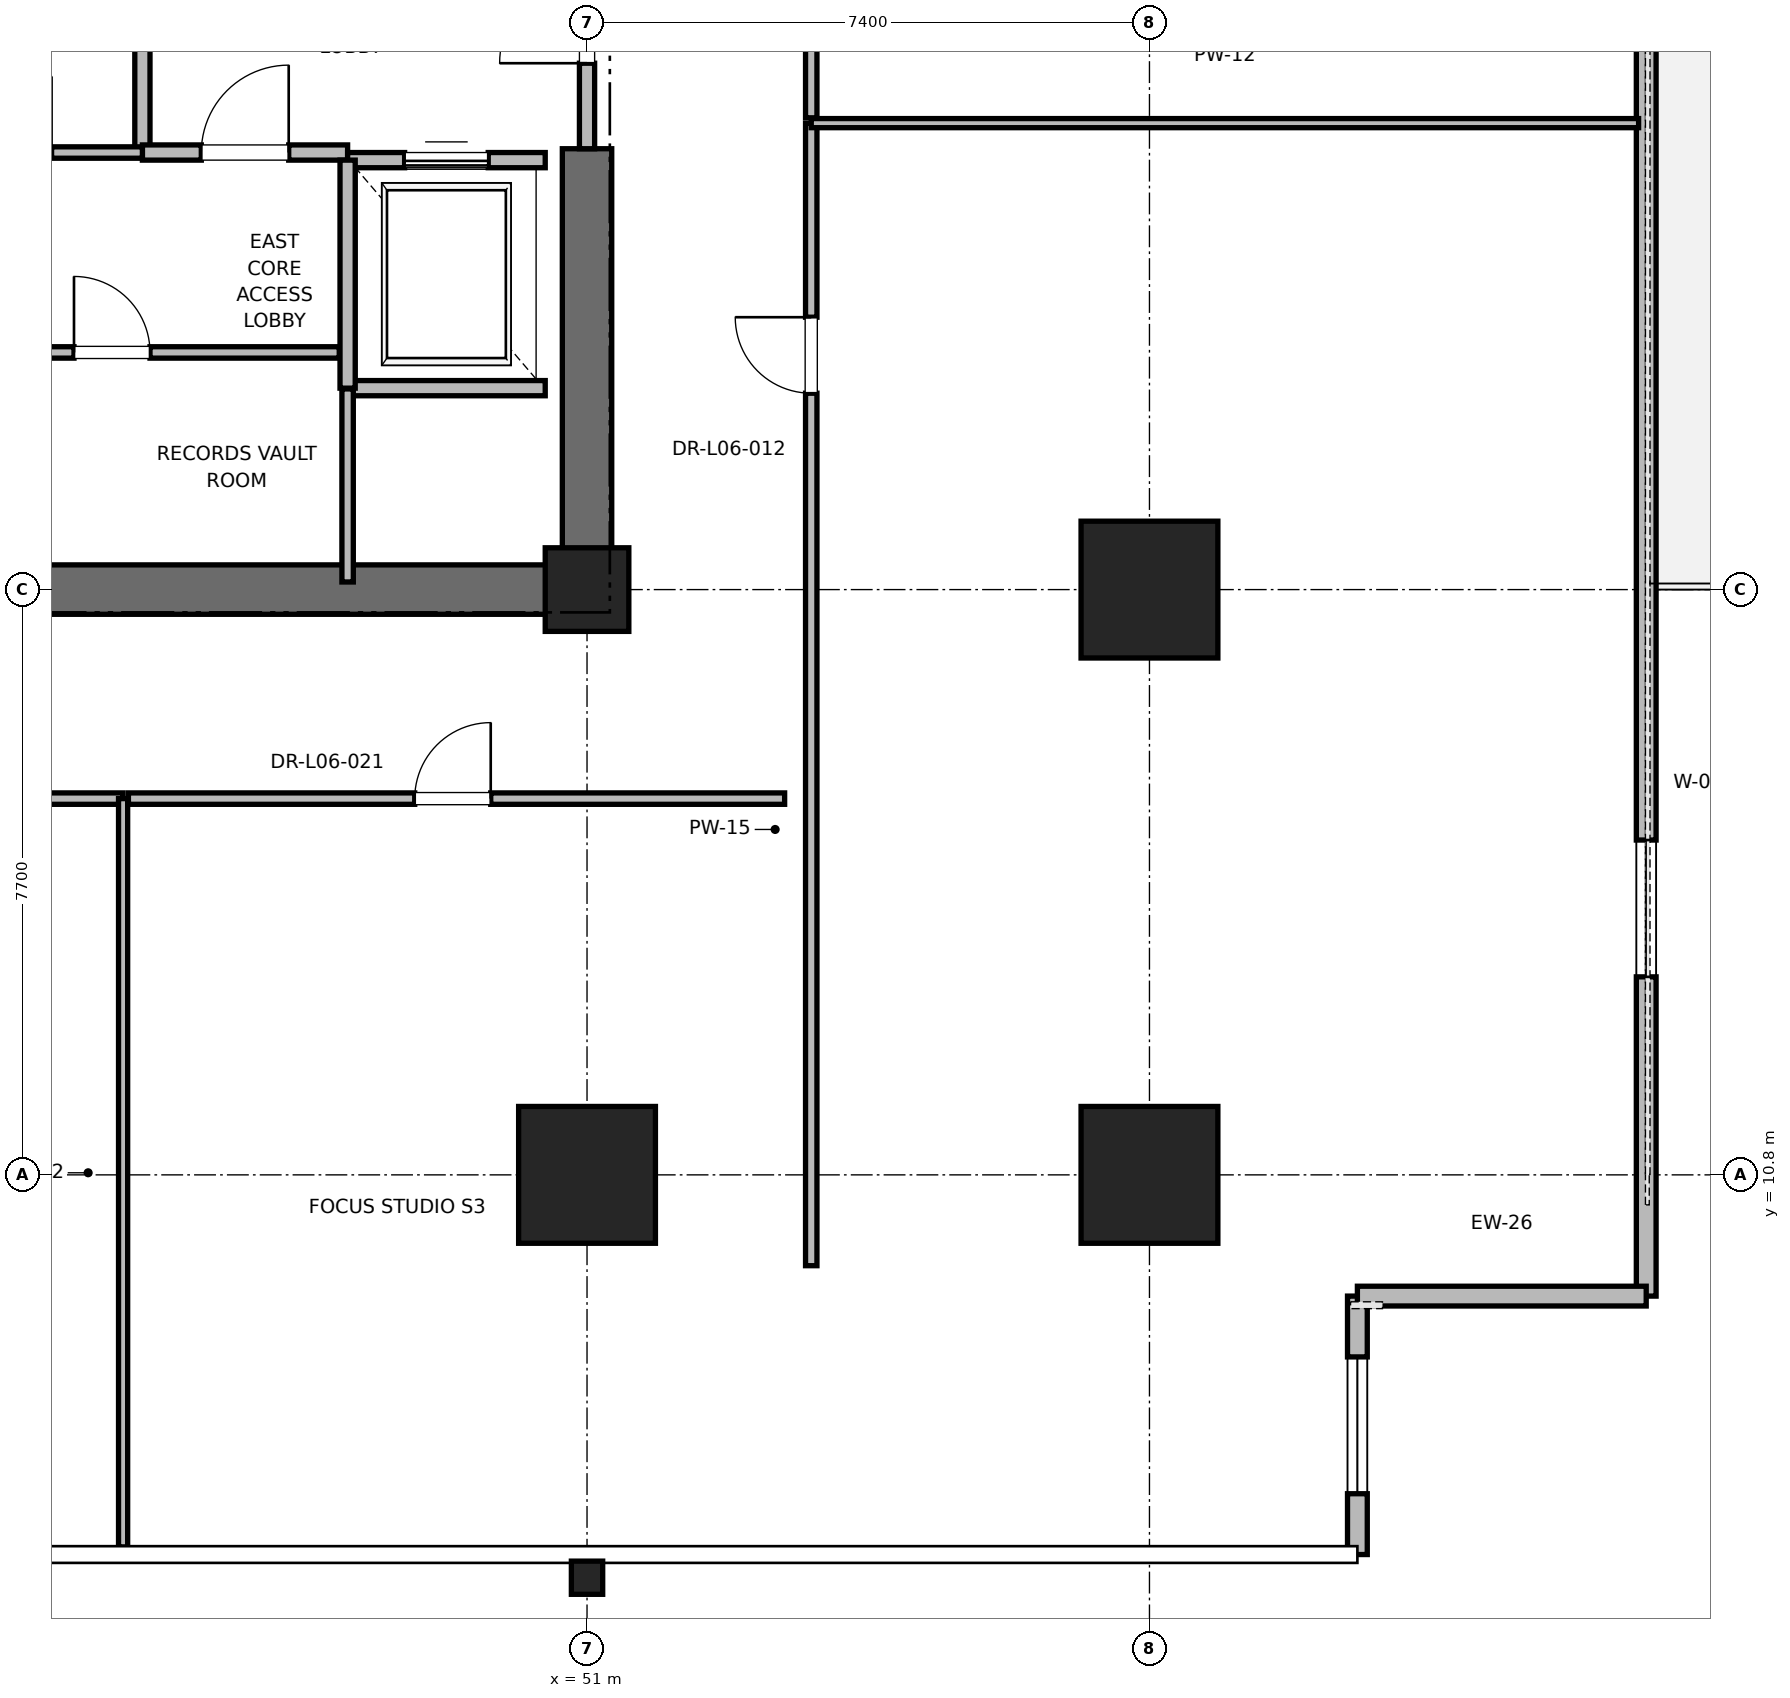
"""IFC4 building model, lengths in metres.
Left out: names, types, materials, properties, quantities, classifications, styles, units other than length and angle.
Written with IfcOpenShell. Run it as: python <this file> out.ifc"""

import sys

from ifc_helpers import new_model, si_unit, direction, frame, frame_2d, origin, origin_2d, place, context, subcontext, project, spatial, rectangle, i_section, extrude, element, fill, save


model = new_model("IFC4")
c1 = context("Model", 3, precision=1e-05, world=origin(), true_north=direction((0.0, 1.0)))
c2 = subcontext(c1, "Body", "Model", "MODEL_VIEW")
j1 = project(units=[si_unit("LENGTHUNIT", "METRE"), si_unit("PLANEANGLEUNIT", "RADIAN")], contexts=[c1])
p1 = place(None, origin())
s1 = spatial("IfcSite", under=j1, at=p1, CompositionType="ELEMENT")
p2 = place(p1, origin())
s2 = spatial("IfcBuilding", under=s1, at=p2, CompositionType="ELEMENT")
p3 = place(p2, frame((0.0, 0.0, 31.6)))
s3 = spatial("IfcBuildingStorey", under=s2, at=p3, CompositionType="ELEMENT", Elevation=31.6)
for number, where, z_axis, x_axis in (
    (1, (51.0, 10.8, 0.0), (0.0, 0.0, 1.0), (1.0, 0.0, 0.0)),
    (2, (58.4, 18.5, 0.0), (0.0, 0.0, 1.0), (1.0, 0.0, 0.0)),
    (3, (58.4, 10.8, 0.0), (0.0, 0.0, 1.0), (1.0, 0.0, 0.0)),
):
    element("IfcColumn", number, at=place(p3, frame(where, z_axis=z_axis, x_axis=x_axis)), inside=s3, PredefinedType="COLUMN", context=c2, shape_type="SweptSolid", body=[
        extrude(rectangle(XDim=1.8, YDim=1.8, at=origin_2d()), origin(), (0.0, 0.0, 1.0), 4.0),
    ])
p4 = place(p3, frame((51.0, 5.5, 0.0), z_axis=(0.0, 0.0, 1.0), x_axis=(1.0, 0.0, 0.0)))
e4 = element("IfcColumn", 4, at=p4, inside=s3, PredefinedType="COLUMN", context=c2, shape_type="SweptSolid", body=[
    extrude(i_section(OverallWidth=0.412, OverallDepth=0.437, WebThickness=0.036, FlangeThickness=0.058, FilletRadius=0.015, at=origin_2d()), origin(), (0.0, 0.0, 1.0), 4.0),
])
p5 = place(p3, frame((51.0, 18.5, 0.0), z_axis=(0.0, 0.0, 1.0), x_axis=(1.0, 0.0, 0.0)))
e5 = element("IfcColumn", 5, at=p5, inside=s3, PredefinedType="PILASTER", context=c2, shape_type="SweptSolid", body=[
    extrude(rectangle(XDim=1.1, YDim=1.1, at=origin_2d()), origin(), (0.0, 0.0, 1.0), 4.0),
])
p6 = place(p3, frame((41.8, 18.5, 0.0), z_axis=(0.0, 0.0, 1.0), x_axis=(1.0, 0.0, 0.0)))
e6 = element("IfcWall", 6, at=p6, inside=s3, PredefinedType="SHEAR", context=c2, shape_type="SweptSolid", body=[
    extrude(rectangle(XDim=9.2, YDim=0.65, at=frame_2d((4.6, 0.0))), origin(), (0.0, 0.0, 1.0), 3.76),
])
p7 = place(p3, frame((51.0, 18.5, 0.0), z_axis=(0.0, 0.0, 1.0), x_axis=(0.0, 1.0, 0.0)))
e7 = element("IfcWall", 7, at=p7, inside=s3, PredefinedType="SHEAR", context=c2, shape_type="SweptSolid", body=[
    extrude(rectangle(XDim=5.8, YDim=0.65, at=frame_2d((2.9, 0.0))), origin(), (0.0, 0.0, 1.0), 3.76),
])
p8 = place(p3, frame((64.936, 9.205, 0.0), z_axis=(0.0, 0.0, 1.0), x_axis=(0.0, 1.0, 0.0)))
e8 = element("IfcWall", 8, at=p8, inside=s3, PredefinedType="PARAPET", context=c2, shape_type="SweptSolid", body=[
    extrude(rectangle(XDim=36.59, YDim=0.26, at=frame_2d((18.295, 0.0))), origin(), (0.0, 0.0, 1.0), 2.889),
])
p9 = place(p8, frame((4.2, 0.0, 0.85)))
e9 = element("IfcOpeningElement", 9, at=p9, cuts=e8, PredefinedType="OPENING", context=c2, shape_type="SweptSolid", body=[
    extrude(rectangle(XDim=1.8, YDim=2.2, at=frame_2d((0.9, 1.1))), frame((0.0, 0.13, 0.0), z_axis=(0.0, -1.0, 0.0), x_axis=(1.0, 0.0, 0.0)), (0.0, 0.0, 1.0), 0.26),
])
p10 = place(p8, frame((17.695, 0.0, 0.0)))
e10 = element("IfcOpeningElement", 10, at=p10, cuts=e8, PredefinedType="OPENING", context=c2, shape_type="SweptSolid", body=[
    extrude(rectangle(XDim=1.2, YDim=2.2, at=frame_2d((0.6, 1.1))), frame((0.0, 0.13, 0.0), z_axis=(0.0, -1.0, 0.0), x_axis=(1.0, 0.0, 0.0)), (0.0, 0.0, 1.0), 0.26),
])
p11 = place(p8, frame((30.59, 0.0, 0.85)))
e11 = element("IfcOpeningElement", 11, at=p11, cuts=e8, PredefinedType="OPENING", context=c2, shape_type="SweptSolid", body=[
    extrude(rectangle(XDim=1.8, YDim=2.2, at=frame_2d((0.9, 1.1))), frame((0.0, 0.13, 0.0), z_axis=(0.0, -1.0, 0.0), x_axis=(1.0, 0.0, 0.0)), (0.0, 0.0, 1.0), 0.26),
])
p12 = place(p3, frame((61.136, 5.805, 0.0), z_axis=(0.0, 0.0, 1.0), x_axis=(0.0, 1.0, 0.0)))
e12 = element("IfcWall", 12, at=p12, inside=s3, PredefinedType="PARAPET", context=c2, shape_type="SweptSolid", body=[
    extrude(rectangle(XDim=3.4, YDim=0.26, at=frame_2d((1.7, 0.0))), origin(), (0.0, 0.0, 1.0), 3.76),
])
p13 = place(p12, frame((0.8, 0.0, 0.85)))
e13 = element("IfcOpeningElement", 13, at=p13, cuts=e12, PredefinedType="OPENING", context=c2, shape_type="SweptSolid", body=[
    extrude(rectangle(XDim=1.8, YDim=2.2, at=frame_2d((0.9, 1.1))), frame((0.0, 0.13, 0.0), z_axis=(0.0, -1.0, 0.0), x_axis=(1.0, 0.0, 0.0)), (0.0, 0.0, 1.0), 0.26),
])
p14 = place(p3, frame((61.136, 9.205, 0.0), z_axis=(0.0, 0.0, 1.0), x_axis=(1.0, 0.0, 0.0)))
e14 = element("IfcWall", 14, at=p14, inside=s3, PredefinedType="PARAPET", context=c2, shape_type="SweptSolid", body=[
    extrude(rectangle(XDim=3.8, YDim=0.26, at=frame_2d((1.9, 0.0))), origin(), (0.0, 0.0, 1.0), 3.76),
])
p15 = place(p3, frame((45.15, 24.25, 0.0), z_axis=(0.0, 0.0, 1.0), x_axis=(0.0, 1.0, 0.0)))
e15 = element("IfcWall", 15, at=p15, inside=s3, PredefinedType="PARTITIONING", context=c2, shape_type="SweptSolid", body=[
    extrude(rectangle(XDim=3.37, YDim=0.2, at=frame_2d((1.685, 0.0))), origin(), (0.0, 0.0, 1.0), 3.76),
])
p16 = place(p3, frame((45.15, 24.25, 0.0), z_axis=(0.0, 0.0, 1.0), x_axis=(1.0, 0.0, 0.0)))
e16 = element("IfcWall", 16, at=p16, inside=s3, PredefinedType="PARTITIONING", context=c2, shape_type="SweptSolid", body=[
    extrude(rectangle(XDim=2.7, YDim=0.2, at=frame_2d((1.35, 0.0))), origin(), (0.0, 0.0, 1.0), 3.76),
])
p17 = place(p16, frame((0.775, 0.0, 0.0)))
e17 = element("IfcOpeningElement", 17, at=p17, cuts=e16, PredefinedType="OPENING", context=c2, shape_type="SweptSolid", body=[
    extrude(rectangle(XDim=1.15, YDim=2.2, at=frame_2d((0.575, 1.1))), frame((0.0, 0.1, 0.0), z_axis=(0.0, -1.0, 0.0), x_axis=(1.0, 0.0, 0.0)), (0.0, 0.0, 1.0), 0.2),
])
p18 = place(p3, frame((51.0, 24.3, 0.0), z_axis=(0.0, 0.0, 1.0), x_axis=(0.0, 1.0, 0.0)))
e18 = element("IfcWall", 18, at=p18, inside=s3, PredefinedType="PARTITIONING", context=c2, shape_type="SweptSolid", body=[
    extrude(rectangle(XDim=3.4, YDim=0.2, at=frame_2d((1.7, 0.0))), origin(), (0.0, 0.0, 1.0), 2.54),
])
p19 = place(p18, frame((1.125, 0.0, 0.0)))
e19 = element("IfcOpeningElement", 19, at=p19, cuts=e18, PredefinedType="OPENING", context=c2, shape_type="SweptSolid", body=[
    extrude(rectangle(XDim=1.15, YDim=2.2, at=frame_2d((0.575, 1.1))), frame((0.0, 0.1, 0.0), z_axis=(0.0, -1.0, 0.0), x_axis=(1.0, 0.0, 0.0)), (0.0, 0.0, 1.0), 0.2),
])
p20 = place(p3, frame((47.85, 21.15, 0.0), z_axis=(0.0, 0.0, 1.0), x_axis=(1.0, 0.0, 0.0)))
e20 = element("IfcWall", 20, at=p20, inside=s3, PredefinedType="SOLIDWALL", context=c2, shape_type="SweptSolid", body=[
    extrude(rectangle(XDim=2.6, YDim=0.2, at=frame_2d((1.3, 0.0))), origin(), (0.0, 0.0, 1.0), 3.76),
])
p21 = place(p3, frame((50.45, 24.15, 0.0), z_axis=(0.0, 0.0, 1.0), x_axis=(-1.0, 0.0, 0.0)))
e21 = element("IfcWall", 21, at=p21, inside=s3, PredefinedType="SOLIDWALL", context=c2, shape_type="SweptSolid", body=[
    extrude(rectangle(XDim=2.6, YDim=0.2, at=frame_2d((1.3, 0.0))), origin(), (0.0, 0.0, 1.0), 2.54),
])
p22 = place(p21, frame((0.75, 0.0, 0.0)))
e22 = element("IfcOpeningElement", 22, at=p22, cuts=e21, PredefinedType="OPENING", context=c2, shape_type="SweptSolid", body=[
    extrude(rectangle(XDim=1.1, YDim=2.2, at=frame_2d((0.55, 1.1))), frame((0.0, 0.1, 0.0), z_axis=(0.0, -1.0, 0.0), x_axis=(1.0, 0.0, 0.0)), (0.0, 0.0, 1.0), 0.2),
])
p23 = place(p3, frame((47.85, 24.15, 0.0), z_axis=(0.0, 0.0, 1.0), x_axis=(0.0, -1.0, 0.0)))
e23 = element("IfcWall", 23, at=p23, inside=s3, PredefinedType="SOLIDWALL", context=c2, shape_type="SweptSolid", body=[
    extrude(rectangle(XDim=3.0, YDim=0.2, at=frame_2d((1.5, 0.0))), origin(), (0.0, 0.0, 1.0), 3.76),
])
p24 = place(p3, frame((47.85, 18.6, 0.0), z_axis=(0.0, 0.0, 1.0), x_axis=(0.0, 1.0, 0.0)))
e24 = element("IfcWall", 24, at=p24, inside=s3, PredefinedType="PARTITIONING", context=c2, shape_type="SweptSolid", body=[
    extrude(rectangle(XDim=2.54, YDim=0.15, at=frame_2d((1.27, 0.0))), origin(), (0.0, 0.0, 1.0), 2.85),
])
p25 = place(p3, frame((41.76, 21.62, 0.0), z_axis=(0.0, 0.0, 1.0), x_axis=(1.0, 0.0, 0.0)))
e25 = element("IfcWall", 25, at=p25, inside=s3, PredefinedType="PARTITIONING", context=c2, shape_type="SweptSolid", body=[
    extrude(rectangle(XDim=5.98, YDim=0.15, at=frame_2d((2.99, 0.0))), origin(), (0.0, 0.0, 1.0), 2.85),
])
p26 = place(p25, frame((2.49, 0.0, 0.0)))
e26 = element("IfcOpeningElement", 26, at=p26, cuts=e25, PredefinedType="OPENING", context=c2, shape_type="SweptSolid", body=[
    extrude(rectangle(XDim=1.0, YDim=2.15, at=frame_2d((0.5, 1.075))), frame((0.0, 0.075, 0.0), z_axis=(0.0, -1.0, 0.0), x_axis=(1.0, 0.0, 0.0)), (0.0, 0.0, 1.0), 0.15),
])
p27 = place(p3, frame((41.76, 24.25, 0.0), z_axis=(0.0, 0.0, 1.0), x_axis=(1.0, 0.0, 0.0)))
e27 = element("IfcWall", 27, at=p27, inside=s3, PredefinedType="PARTITIONING", context=c2, shape_type="SweptSolid", body=[
    extrude(rectangle(XDim=3.39, YDim=0.15, at=frame_2d((1.695, 0.0))), origin(), (0.0, 0.0, 1.0), 2.85),
])
p28 = place(p27, frame((1.195, 0.0, 0.0)))
e28 = element("IfcOpeningElement", 28, at=p28, cuts=e27, PredefinedType="OPENING", context=c2, shape_type="SweptSolid", body=[
    extrude(rectangle(XDim=1.0, YDim=2.15, at=frame_2d((0.5, 1.075))), frame((0.0, 0.075, 0.0), z_axis=(0.0, -1.0, 0.0), x_axis=(1.0, 0.0, 0.0)), (0.0, 0.0, 1.0), 0.15),
])
p29 = place(p3, frame((35.174, 15.75, 0.0), z_axis=(0.0, 0.0, 1.0), x_axis=(1.0, 0.0, 0.0)))
e29 = element("IfcWall", 29, at=p29, inside=s3, PredefinedType="PARTITIONING", context=c2, shape_type="SweptSolid", body=[
    extrude(rectangle(XDim=9.722, YDim=0.15, at=frame_2d((4.861, 0.0))), origin(), (0.0, 0.0, 1.0), 2.85),
])
p30 = place(p29, frame((4.326, 0.0, 0.0)))
e30 = element("IfcOpeningElement", 30, at=p30, cuts=e29, PredefinedType="OPENING", context=c2, shape_type="SweptSolid", body=[
    extrude(rectangle(XDim=1.0, YDim=2.15, at=frame_2d((0.5, 1.075))), frame((0.0, 0.075, 0.0), z_axis=(0.0, -1.0, 0.0), x_axis=(1.0, 0.0, 0.0)), (0.0, 0.0, 1.0), 0.15),
])
p31 = place(p3, frame((44.896, 5.905, 0.0), z_axis=(0.0, 0.0, 1.0), x_axis=(0.0, 1.0, 0.0)))
e31 = element("IfcWall", 31, at=p31, inside=s3, PredefinedType="PARTITIONING", context=c2, shape_type="SweptSolid", body=[
    extrude(rectangle(XDim=9.845, YDim=0.12, at=frame_2d((4.922, 0.0))), origin(), (0.0, 0.0, 1.0), 2.39),
])
p32 = place(p3, frame((44.966, 15.75, 0.0), z_axis=(0.0, 0.0, 1.0), x_axis=(1.0, 0.0, 0.0)))
e32 = element("IfcWall", 32, at=p32, inside=s3, PredefinedType="PARTITIONING", context=c2, shape_type="SweptSolid", body=[
    extrude(rectangle(XDim=8.634, YDim=0.15, at=frame_2d((4.317, 0.0))), origin(), (0.0, 0.0, 1.0), 2.85),
])
p33 = place(p32, frame((3.767, 0.0, 0.0)))
e33 = element("IfcOpeningElement", 33, at=p33, cuts=e32, PredefinedType="OPENING", context=c2, shape_type="SweptSolid", body=[
    extrude(rectangle(XDim=1.0, YDim=2.15, at=frame_2d((0.5, 1.075))), frame((0.0, 0.075, 0.0), z_axis=(0.0, -1.0, 0.0), x_axis=(1.0, 0.0, 0.0)), (0.0, 0.0, 1.0), 0.15),
])
p34 = place(p3, frame((53.95, 9.605, 0.0), z_axis=(0.0, 0.0, 1.0), x_axis=(0.0, 1.0, 0.0)))
e34 = element("IfcWall", 34, at=p34, inside=s3, PredefinedType="PARTITIONING", context=c2, shape_type="SweptSolid", body=[
    extrude(rectangle(XDim=15.032, YDim=0.15, at=frame_2d((7.516, 0.0))), origin(), (0.0, 0.0, 1.0), 2.85),
])
p35 = place(p34, frame((11.479, 0.0, 0.0)))
e35 = element("IfcOpeningElement", 35, at=p35, cuts=e34, PredefinedType="OPENING", context=c2, shape_type="SweptSolid", body=[
    extrude(rectangle(XDim=1.0, YDim=2.15, at=frame_2d((0.5, 1.075))), frame((0.0, 0.075, 0.0), z_axis=(0.0, -1.0, 0.0), x_axis=(1.0, 0.0, 0.0)), (0.0, 0.0, 1.0), 0.15),
])
p36 = place(p3, frame((53.95, 24.637, 0.0), z_axis=(0.0, 0.0, 1.0), x_axis=(1.0, 0.0, 0.0)))
e36 = element("IfcWall", 36, at=p36, inside=s3, PredefinedType="PARTITIONING", context=c2, shape_type="SweptSolid", body=[
    extrude(rectangle(XDim=10.886, YDim=0.12, at=frame_2d((5.443, 0.0))), origin(), (0.0, 0.0, 1.0), 2.85),
])
p37 = place(p3, frame((53.95, 24.707, 0.0), z_axis=(0.0, 0.0, 1.0), x_axis=(0.0, 1.0, 0.0)))
e37 = element("IfcWall", 37, at=p37, inside=s3, PredefinedType="PARTITIONING", context=c2, shape_type="SweptSolid", body=[
    extrude(rectangle(XDim=20.688, YDim=0.15, at=frame_2d((10.344, 0.0))), origin(), (0.0, 0.0, 1.0), 2.85),
])
p38 = place(p37, frame((5.347, 0.0, 0.0)))
e38 = element("IfcOpeningElement", 38, at=p38, cuts=e37, PredefinedType="OPENING", context=c2, shape_type="SweptSolid", body=[
    extrude(rectangle(XDim=1.0, YDim=2.15, at=frame_2d((0.5, 1.075))), frame((0.0, 0.075, 0.0), z_axis=(0.0, -1.0, 0.0), x_axis=(1.0, 0.0, 0.0)), (0.0, 0.0, 1.0), 0.15),
])
p39 = place(p9, origin())
e39 = element("IfcWindow", 39, at=p39, inside=s3, PartitioningType="SINGLE_PANEL", PredefinedType="WINDOW", context=c2, shape_type="SweptSolid", body=[
    extrude(rectangle(XDim=1.8, YDim=2.2, at=frame_2d((0.9, 1.1))), frame((0.0, 0.03, 0.0), z_axis=(0.0, -1.0, 0.0), x_axis=(1.0, 0.0, 0.0)), (0.0, 0.0, 1.0), 0.06),
])
fill(e9, e39)
p40 = place(p13, origin())
e40 = element("IfcWindow", 40, at=p40, inside=s3, PartitioningType="SINGLE_PANEL", PredefinedType="WINDOW", context=c2, shape_type="SweptSolid", body=[
    extrude(rectangle(XDim=1.8, YDim=2.2, at=frame_2d((0.9, 1.1))), frame((0.0, 0.03, 0.0), z_axis=(0.0, -1.0, 0.0), x_axis=(1.0, 0.0, 0.0)), (0.0, 0.0, 1.0), 0.06),
])
fill(e13, e40)
p41 = place(p17, origin())
e41 = element("IfcDoor", 41, at=p41, inside=s3, OperationType="SINGLE_SWING_RIGHT", PredefinedType="DOOR", context=c2, shape_type="SweptSolid", body=[
    extrude(rectangle(XDim=1.15, YDim=2.2, at=frame_2d((0.575, 1.1))), frame((0.0, 0.025, 0.0), z_axis=(0.0, -1.0, 0.0), x_axis=(1.0, 0.0, 0.0)), (0.0, 0.0, 1.0), 0.05),
])
fill(e17, e41)
p42 = place(p19, origin())
e42 = element("IfcDoor", 42, at=p42, inside=s3, OperationType="SINGLE_SWING_LEFT", PredefinedType="DOOR", context=c2, shape_type="SweptSolid", body=[
    extrude(rectangle(XDim=1.15, YDim=2.2, at=frame_2d((0.575, 1.1))), frame((0.0, 0.025, 0.0), z_axis=(0.0, -1.0, 0.0), x_axis=(1.0, 0.0, 0.0)), (0.0, 0.0, 1.0), 0.05),
])
fill(e19, e42)
p43 = place(p22, origin())
e43 = element("IfcDoor", 43, at=p43, inside=s3, OperationType="SLIDING_TO_RIGHT", PredefinedType="DOOR", context=c2, shape_type="SweptSolid", body=[
    extrude(rectangle(XDim=1.1, YDim=2.2, at=frame_2d((0.55, 1.1))), frame((0.0, 0.025, 0.0), z_axis=(0.0, -1.0, 0.0), x_axis=(1.0, 0.0, 0.0)), (0.0, 0.0, 1.0), 0.05),
])
fill(e22, e43)
p44 = place(p26, origin())
e44 = element("IfcDoor", 44, at=p44, inside=s3, OperationType="SINGLE_SWING_LEFT", PredefinedType="DOOR", context=c2, shape_type="SweptSolid", body=[
    extrude(rectangle(XDim=1.0, YDim=2.15, at=frame_2d((0.5, 1.075))), frame((0.0, 0.025, 0.0), z_axis=(0.0, -1.0, 0.0), x_axis=(1.0, 0.0, 0.0)), (0.0, 0.0, 1.0), 0.05),
])
fill(e26, e44)
p45 = place(p33, origin())
e45 = element("IfcDoor", 45, at=p45, inside=s3, OperationType="SINGLE_SWING_RIGHT", PredefinedType="DOOR", context=c2, shape_type="SweptSolid", body=[
    extrude(rectangle(XDim=1.0, YDim=2.15, at=frame_2d((0.5, 1.075))), frame((0.0, 0.025, 0.0), z_axis=(0.0, -1.0, 0.0), x_axis=(1.0, 0.0, 0.0)), (0.0, 0.0, 1.0), 0.05),
])
fill(e33, e45)
p46 = place(p35, origin())
e46 = element("IfcDoor", 46, at=p46, inside=s3, OperationType="SINGLE_SWING_RIGHT", PredefinedType="DOOR", context=c2, shape_type="SweptSolid", body=[
    extrude(rectangle(XDim=1.0, YDim=2.15, at=frame_2d((0.5, 1.075))), frame((0.0, 0.025, 0.0), z_axis=(0.0, -1.0, 0.0), x_axis=(1.0, 0.0, 0.0)), (0.0, 0.0, 1.0), 0.05),
])
fill(e35, e46)
save(model, sys.argv[1])
